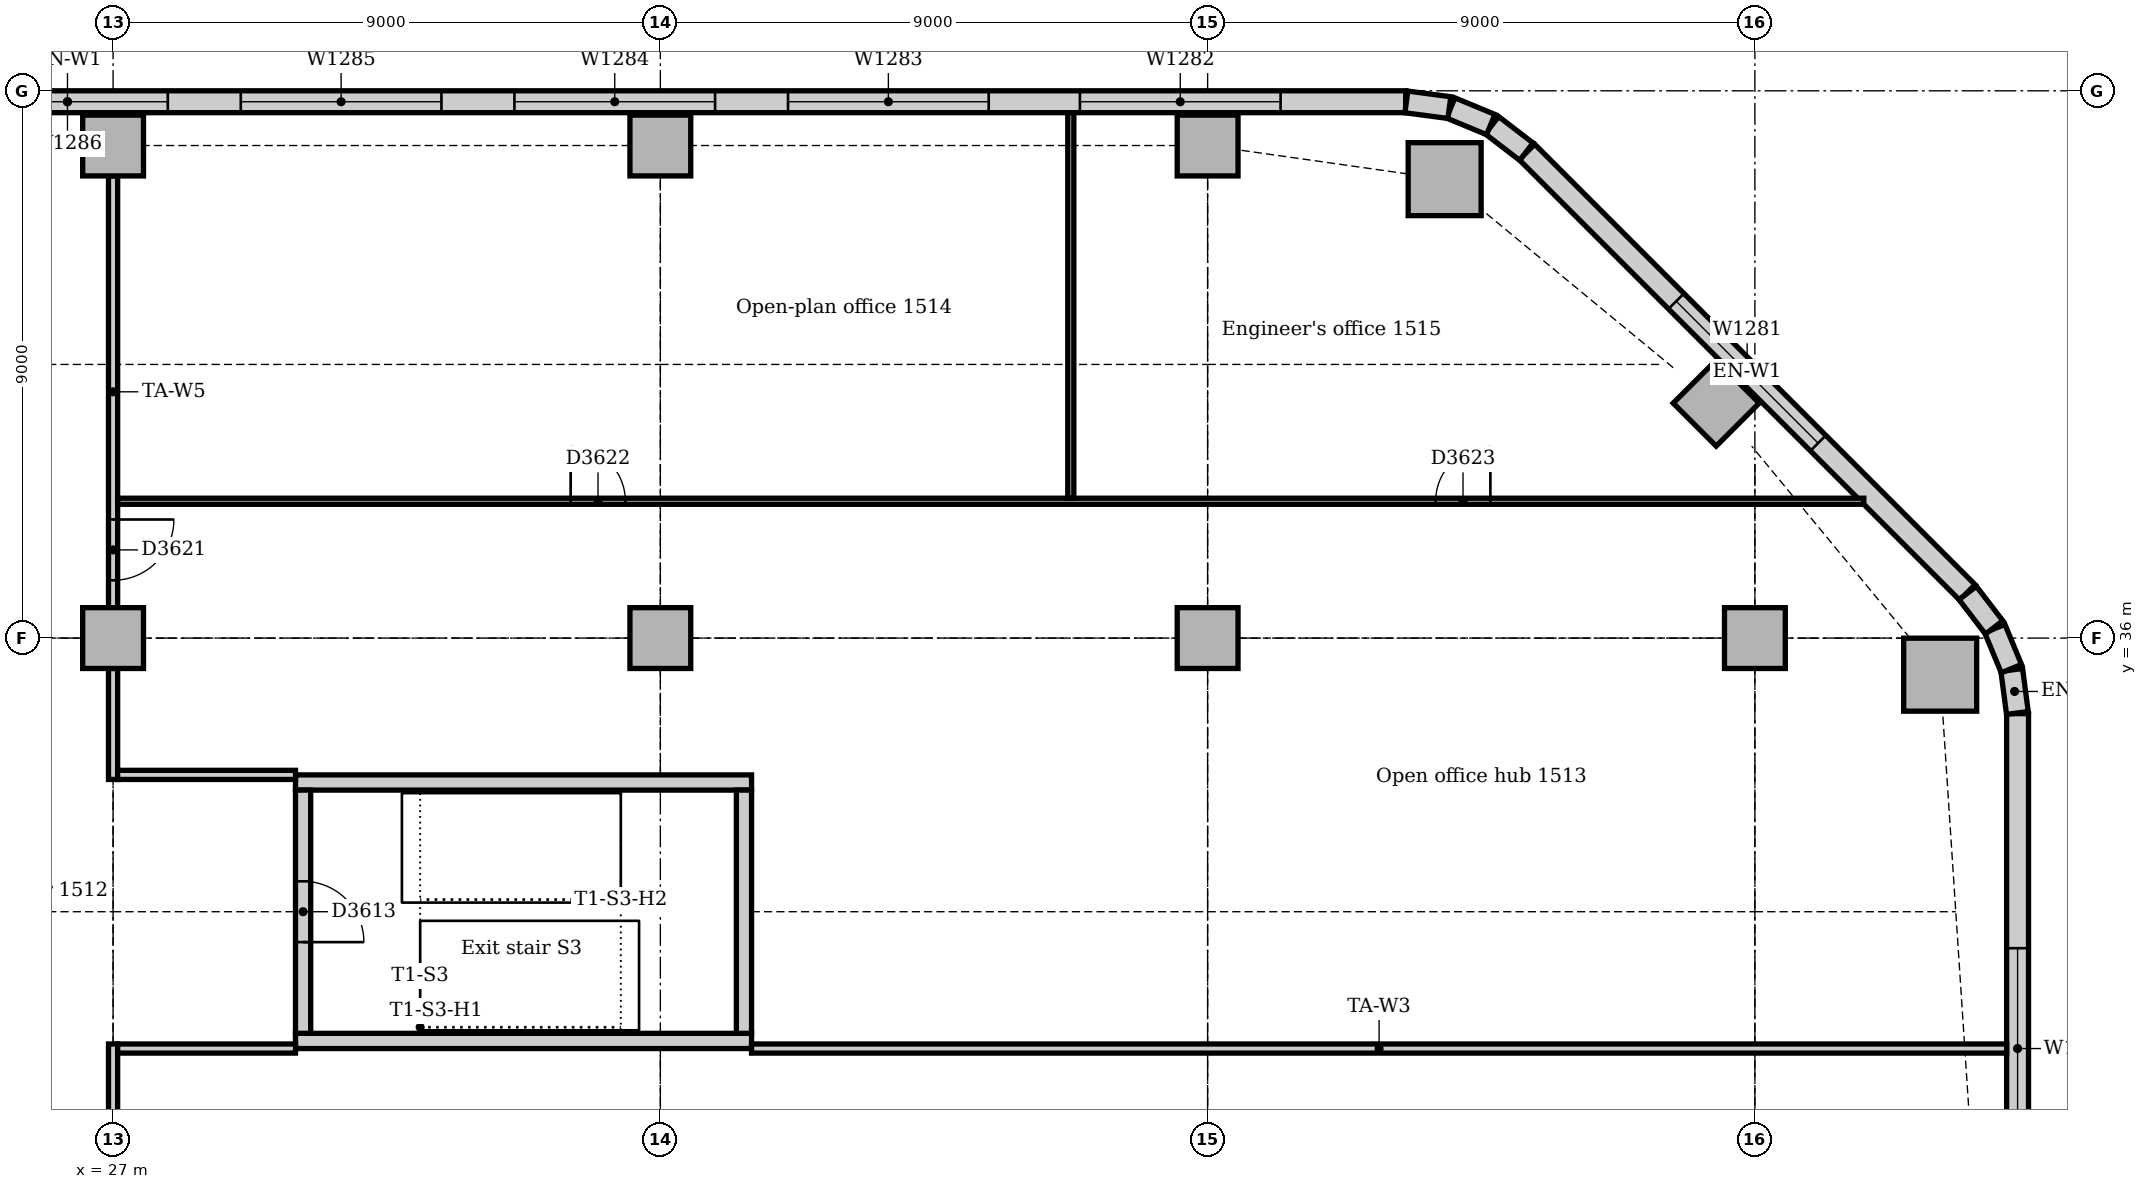
"""IFC4 building model, lengths in metres.
Left out: names, types, materials, properties, quantities, classifications, styles, units other than length and angle.
Written with IfcOpenShell. Run it as: python <this file> out.ifc"""

import sys

from ifc_helpers import new_model, si_unit, direction, frame, frame_2d, origin, origin_2d, place, context, subcontext, project, spatial, rectangle, extrude, element, fill, save


model = new_model("IFC4")
c1 = context("Model", 3, precision=1e-05, world=origin(), true_north=direction((0.0, 1.0)))
c2 = subcontext(c1, "Body", "Model", "MODEL_VIEW")
j1 = project(units=[si_unit("LENGTHUNIT", "METRE"), si_unit("PLANEANGLEUNIT", "RADIAN")], contexts=[c1])
p1 = place(None, origin())
s1 = spatial("IfcSite", under=j1, at=p1, CompositionType="ELEMENT")
p2 = place(p1, origin())
s2 = spatial("IfcBuilding", under=s1, at=p2, CompositionType="ELEMENT")
p3 = place(p2, frame((0.0, 0.0, 67.0)))
s3 = spatial("IfcBuildingStorey", under=s2, at=p3, CompositionType="ELEMENT", Elevation=67.0)
for number, where, z_axis, x_axis in (
    (1, (30.0, 29.375, 0.0), (0.0, 0.0, 1.0), (1.0, 0.0, 0.0)),
    (2, (37.5, 33.625, 0.0), (0.0, 0.0, 1.0), (-1.0, 0.0, 0.0)),
):
    element("IfcWall", number, at=place(p3, frame(where, z_axis=z_axis, x_axis=x_axis)), inside=s3, PredefinedType="SOLIDWALL", context=c2, shape_type="SweptSolid", body=[
        extrude(rectangle(XDim=7.5, YDim=0.25, at=frame_2d((3.75, 0.0))), origin(), (0.0, 0.0, 1.0), 4.0),
    ])
p4 = place(p3, frame((37.375, 29.5, 0.0), z_axis=(0.0, 0.0, 1.0), x_axis=(0.0, 1.0, 0.0)))
e3 = element("IfcWall", 3, at=p4, inside=s3, PredefinedType="SOLIDWALL", context=c2, shape_type="SweptSolid", body=[
    extrude(rectangle(XDim=4.0, YDim=0.25, at=frame_2d((2.0, 0.0))), origin(), (0.0, 0.0, 1.0), 4.0),
])
p5 = place(p3, frame((30.125, 33.5, 0.0), z_axis=(0.0, 0.0, 1.0), x_axis=(0.0, -1.0, 0.0)))
e4 = element("IfcWall", 4, at=p5, inside=s3, PredefinedType="SOLIDWALL", context=c2, shape_type="SweptSolid", body=[
    extrude(rectangle(XDim=4.0, YDim=0.25, at=frame_2d((2.0, 0.0))), origin(), (0.0, 0.0, 1.0), 4.0),
])
p6 = place(p5, frame((1.5, 0.0, 0.0)))
e5 = element("IfcOpeningElement", 5, at=p6, cuts=e4, PredefinedType="OPENING", context=c2, shape_type="SweptSolid", body=[
    extrude(rectangle(XDim=1.0, YDim=2.1, at=frame_2d((0.5, 1.05))), frame((0.0, 0.135, 0.0), z_axis=(0.0, -1.0, 0.0), x_axis=(1.0, 0.0, 0.0)), (0.0, 0.0, 1.0), 0.27),
])
for number, where, z_axis, x_axis in (
    (6, (57.047, 35.398, 0.0), (0.0, 0.0, 1.0), (1.0, 0.0, 0.0)),
    (7, (48.898, 43.547, 0.0), (0.0, 0.0, 1.0), (1.0, 0.0, 0.0)),
):
    element("IfcColumn", number, at=place(p3, frame(where, z_axis=z_axis, x_axis=x_axis)), inside=s3, PredefinedType="COLUMN", context=c2, shape_type="SweptSolid", body=[
        extrude(rectangle(XDim=1.2, YDim=1.2, at=origin_2d()), origin(), (0.0, 0.0, 1.0), 3.85),
    ])
for number, where, z_axis, x_axis in (
    (8, (53.364, 39.864, 0.0), (0.0, 0.0, 1.0), (0.707, 0.707, 0.0)),
    (9, (27.0, 44.1, 0.0), (0.0, 0.0, 1.0), (1.0, 0.0, 0.0)),
    (10, (36.0, 44.1, 0.0), (0.0, 0.0, 1.0), (1.0, 0.0, 0.0)),
    (11, (45.0, 44.1, 0.0), (0.0, 0.0, 1.0), (1.0, 0.0, 0.0)),
    (12, (27.0, 36.0, 0.0), (0.0, 0.0, 1.0), (1.0, 0.0, 0.0)),
    (13, (36.0, 36.0, 0.0), (0.0, 0.0, 1.0), (1.0, 0.0, 0.0)),
    (14, (45.0, 36.0, 0.0), (0.0, 0.0, 1.0), (1.0, 0.0, 0.0)),
    (15, (54.0, 36.0, 0.0), (0.0, 0.0, 1.0), (1.0, 0.0, 0.0)),
):
    element("IfcColumn", number, at=place(p3, frame(where, z_axis=z_axis, x_axis=x_axis)), inside=s3, PredefinedType="COLUMN", context=c2, shape_type="SweptSolid", body=[
        extrude(rectangle(XDim=1.0, YDim=1.0, at=origin_2d()), origin(), (0.0, 0.0, 1.0), 3.85),
    ])
p7 = place(p3, frame((58.32, 10.243, 0.0), z_axis=(0.0, 0.0, 1.0), x_axis=(0.0, 1.0, 0.0)))
e16 = element("IfcWall", 16, at=p7, inside=s3, PredefinedType="STANDARD", context=c2, shape_type="SweptSolid", body=[
    extrude(rectangle(XDim=24.515, YDim=0.36, at=frame_2d((12.257, 0.0))), origin(), (0.0, 0.0, 1.0), 3.85),
])
p8 = place(p7, frame((3.857, 0.0, 0.9)))
e17 = element("IfcOpeningElement", 17, at=p8, cuts=e16, PredefinedType="OPENING", context=c2, shape_type="SweptSolid", body=[
    extrude(rectangle(XDim=3.3, YDim=1.6, at=frame_2d((1.65, 0.8))), frame((0.0, 0.19, 0.0), z_axis=(0.0, -1.0, 0.0), x_axis=(1.0, 0.0, 0.0)), (0.0, 0.0, 1.0), 0.38),
])
p9 = place(p7, frame((8.757, 0.0, 0.9)))
e18 = element("IfcOpeningElement", 18, at=p9, cuts=e16, PredefinedType="OPENING", context=c2, shape_type="SweptSolid", body=[
    extrude(rectangle(XDim=1.8, YDim=1.6, at=frame_2d((0.9, 0.8))), frame((0.0, 0.19, 0.0), z_axis=(0.0, -1.0, 0.0), x_axis=(1.0, 0.0, 0.0)), (0.0, 0.0, 1.0), 0.38),
])
p10 = place(p7, frame((12.857, 0.0, 0.9)))
e19 = element("IfcOpeningElement", 19, at=p10, cuts=e16, PredefinedType="OPENING", context=c2, shape_type="SweptSolid", body=[
    extrude(rectangle(XDim=3.3, YDim=1.6, at=frame_2d((1.65, 0.8))), frame((0.0, 0.19, 0.0), z_axis=(0.0, -1.0, 0.0), x_axis=(1.0, 0.0, 0.0)), (0.0, 0.0, 1.0), 0.38),
])
p11 = place(p7, frame((17.357, 0.0, 0.9)))
e20 = element("IfcOpeningElement", 20, at=p11, cuts=e16, PredefinedType="OPENING", context=c2, shape_type="SweptSolid", body=[
    extrude(rectangle(XDim=3.3, YDim=1.6, at=frame_2d((1.65, 0.8))), frame((0.0, 0.19, 0.0), z_axis=(0.0, -1.0, 0.0), x_axis=(1.0, 0.0, 0.0)), (0.0, 0.0, 1.0), 0.38),
])
p12 = place(p3, frame((57.494, 36.751, 0.0), z_axis=(0.0, 0.0, 1.0), x_axis=(-0.707106781187, 0.707106781187, 0.0)))
e21 = element("IfcWall", 21, at=p12, inside=s3, PredefinedType="STANDARD", context=c2, shape_type="SweptSolid", body=[
    extrude(rectangle(XDim=10.243, YDim=0.36, at=frame_2d((5.121, 0.0))), origin(), (0.0, 0.0, 1.0), 3.85),
])
p13 = place(p12, frame((3.471, 0.0, 0.9)))
e22 = element("IfcOpeningElement", 22, at=p13, cuts=e21, PredefinedType="OPENING", context=c2, shape_type="SweptSolid", body=[
    extrude(rectangle(XDim=3.3, YDim=1.6, at=frame_2d((1.65, 0.8))), frame((0.0, 0.19, 0.0), z_axis=(0.0, -1.0, 0.0), x_axis=(1.0, 0.0, 0.0)), (0.0, 0.0, 1.0), 0.38),
])
p14 = place(p3, frame((48.257, 44.82, 0.0), z_axis=(0.0, 0.0, 1.0), x_axis=(-1.0, 0.0, 0.0)))
e23 = element("IfcWall", 23, at=p14, inside=s3, PredefinedType="STANDARD", context=c2, shape_type="SweptSolid", body=[
    extrude(rectangle(XDim=44.015, YDim=0.36, at=frame_2d((22.007, 0.0))), origin(), (0.0, 0.0, 1.0), 3.85),
])
p15 = place(p14, frame((2.057, 0.0, 0.9)))
e24 = element("IfcOpeningElement", 24, at=p15, cuts=e23, PredefinedType="OPENING", context=c2, shape_type="SweptSolid", body=[
    extrude(rectangle(XDim=3.3, YDim=1.6, at=frame_2d((1.65, 0.8))), frame((0.0, 0.19, 0.0), z_axis=(0.0, -1.0, 0.0), x_axis=(1.0, 0.0, 0.0)), (0.0, 0.0, 1.0), 0.38),
])
p16 = place(p14, frame((6.857, 0.0, 0.9)))
e25 = element("IfcOpeningElement", 25, at=p16, cuts=e23, PredefinedType="OPENING", context=c2, shape_type="SweptSolid", body=[
    extrude(rectangle(XDim=3.3, YDim=1.6, at=frame_2d((1.65, 0.8))), frame((0.0, 0.19, 0.0), z_axis=(0.0, -1.0, 0.0), x_axis=(1.0, 0.0, 0.0)), (0.0, 0.0, 1.0), 0.38),
])
p17 = place(p14, frame((11.357, 0.0, 0.9)))
e26 = element("IfcOpeningElement", 26, at=p17, cuts=e23, PredefinedType="OPENING", context=c2, shape_type="SweptSolid", body=[
    extrude(rectangle(XDim=3.3, YDim=1.6, at=frame_2d((1.65, 0.8))), frame((0.0, 0.19, 0.0), z_axis=(0.0, -1.0, 0.0), x_axis=(1.0, 0.0, 0.0)), (0.0, 0.0, 1.0), 0.38),
])
p18 = place(p14, frame((15.857, 0.0, 0.9)))
e27 = element("IfcOpeningElement", 27, at=p18, cuts=e23, PredefinedType="OPENING", context=c2, shape_type="SweptSolid", body=[
    extrude(rectangle(XDim=3.3, YDim=1.6, at=frame_2d((1.65, 0.8))), frame((0.0, 0.19, 0.0), z_axis=(0.0, -1.0, 0.0), x_axis=(1.0, 0.0, 0.0)), (0.0, 0.0, 1.0), 0.38),
])
p19 = place(p14, frame((20.357, 0.0, 0.9)))
e28 = element("IfcOpeningElement", 28, at=p19, cuts=e23, PredefinedType="OPENING", context=c2, shape_type="SweptSolid", body=[
    extrude(rectangle(XDim=3.3, YDim=1.6, at=frame_2d((1.65, 0.8))), frame((0.0, 0.19, 0.0), z_axis=(0.0, -1.0, 0.0), x_axis=(1.0, 0.0, 0.0)), (0.0, 0.0, 1.0), 0.38),
])
p20 = place(p14, frame((25.957, 0.0, 0.9)))
e29 = element("IfcOpeningElement", 29, at=p20, cuts=e23, PredefinedType="OPENING", context=c2, shape_type="SweptSolid", body=[
    extrude(rectangle(XDim=1.8, YDim=1.6, at=frame_2d((0.9, 0.8))), frame((0.0, 0.19, 0.0), z_axis=(0.0, -1.0, 0.0), x_axis=(1.0, 0.0, 0.0)), (0.0, 0.0, 1.0), 0.38),
])
p21 = place(p14, frame((29.357, 0.0, 0.9)))
e30 = element("IfcOpeningElement", 30, at=p21, cuts=e23, PredefinedType="OPENING", context=c2, shape_type="SweptSolid", body=[
    extrude(rectangle(XDim=3.3, YDim=1.6, at=frame_2d((1.65, 0.8))), frame((0.0, 0.19, 0.0), z_axis=(0.0, -1.0, 0.0), x_axis=(1.0, 0.0, 0.0)), (0.0, 0.0, 1.0), 0.38),
])
p22 = place(p14, frame((33.857, 0.0, 0.9)))
e31 = element("IfcOpeningElement", 31, at=p22, cuts=e23, PredefinedType="OPENING", context=c2, shape_type="SweptSolid", body=[
    extrude(rectangle(XDim=3.3, YDim=1.6, at=frame_2d((1.65, 0.8))), frame((0.0, 0.19, 0.0), z_axis=(0.0, -1.0, 0.0), x_axis=(1.0, 0.0, 0.0)), (0.0, 0.0, 1.0), 0.38),
])
p23 = place(p14, frame((38.357, 0.0, 0.9)))
e32 = element("IfcOpeningElement", 32, at=p23, cuts=e23, PredefinedType="OPENING", context=c2, shape_type="SweptSolid", body=[
    extrude(rectangle(XDim=3.3, YDim=1.6, at=frame_2d((1.65, 0.8))), frame((0.0, 0.19, 0.0), z_axis=(0.0, -1.0, 0.0), x_axis=(1.0, 0.0, 0.0)), (0.0, 0.0, 1.0), 0.38),
])
for number, where, z_axis, x_axis in (
    (33, (58.317, 34.769, 0.0), (0.0, 0.0, 1.0), (-0.131, 0.991, 0.0)),
    (34, (58.218, 35.497, 0.0), (0.0, 0.0, 1.0), (-0.383, 0.924, 0.0)),
):
    element("IfcWall", number, at=place(p3, frame(where, z_axis=z_axis, x_axis=x_axis)), inside=s3, PredefinedType="STANDARD", context=c2, shape_type="SweptSolid", body=[
        extrude(rectangle(XDim=0.713, YDim=0.36, at=frame_2d((0.356, 0.0))), origin(), (0.0, 0.0, 1.0), 3.85),
    ])
for number, where, z_axis, x_axis in (
    (35, (57.934, 36.175, 0.0), (0.0, 0.0, 1.0), (-0.609, 0.793, 0.0)),
    (36, (50.241, 44.0, 0.0), (0.0, 0.0, 1.0), (-0.793, 0.609, 0.0)),
):
    element("IfcWall", number, at=place(p3, frame(where, z_axis=z_axis, x_axis=x_axis)), inside=s3, PredefinedType="STANDARD", context=c2, shape_type="SweptSolid", body=[
        extrude(rectangle(XDim=0.713, YDim=0.36, at=frame_2d((0.357, 0.0))), origin(), (0.0, 0.0, 1.0), 3.85),
    ])
for number, where, z_axis, x_axis in (
    (37, (49.656, 44.445, 0.0), (0.0, 0.0, 1.0), (-0.924, 0.383, 0.0)),
    (38, (48.976, 44.724, 0.0), (0.0, 0.0, 1.0), (-0.991, 0.131, 0.0)),
):
    element("IfcWall", number, at=place(p3, frame(where, z_axis=z_axis, x_axis=x_axis)), inside=s3, PredefinedType="STANDARD", context=c2, shape_type="SweptSolid", body=[
        extrude(rectangle(XDim=0.713, YDim=0.36, at=frame_2d((0.356, 0.0))), origin(), (0.0, 0.0, 1.0), 3.85),
    ])
p24 = place(p3, frame((27.0, 33.675, 0.0), z_axis=(0.0, 0.0, 1.0), x_axis=(0.0, 1.0, 0.0)))
e39 = element("IfcWall", 39, at=p24, inside=s3, PredefinedType="PARTITIONING", context=c2, shape_type="SweptSolid", body=[
    extrude(rectangle(XDim=1.825, YDim=0.15, at=frame_2d((0.912, 0.0))), origin(), (0.0, 0.0, 1.0), 3.158),
])
p25 = place(p3, frame((27.0, 36.5, 0.0), z_axis=(0.0, 0.0, 1.0), x_axis=(0.0, 1.0, 0.0)))
e40 = element("IfcWall", 40, at=p25, inside=s3, PredefinedType="PARTITIONING", context=c2, shape_type="SweptSolid", body=[
    extrude(rectangle(XDim=7.1, YDim=0.15, at=frame_2d((3.55, 0.0))), origin(), (0.0, 0.0, 1.0), 3.158),
])
p26 = place(p25, frame((0.45, 0.0, 0.0)))
e41 = element("IfcOpeningElement", 41, at=p26, cuts=e40, PredefinedType="OPENING", context=c2, shape_type="SweptSolid", body=[
    extrude(rectangle(XDim=1.0, YDim=2.1, at=frame_2d((0.5, 1.05))), frame((0.0, 0.085, 0.0), z_axis=(0.0, -1.0, 0.0), x_axis=(1.0, 0.0, 0.0)), (0.0, 0.0, 1.0), 0.17),
])
p27 = place(p3, frame((27.0, 27.5, 0.0), z_axis=(0.0, 0.0, 1.0), x_axis=(0.0, 1.0, 0.0)))
e42 = element("IfcWall", 42, at=p27, inside=s3, PredefinedType="PARTITIONING", context=c2, shape_type="SweptSolid", body=[
    extrude(rectangle(XDim=1.825, YDim=0.15, at=frame_2d((0.912, 0.0))), origin(), (0.0, 0.0, 1.0), 3.158),
])
for number, where, z_axis, x_axis in (
    (43, (27.075, 29.25, 0.0), (0.0, 0.0, 1.0), (1.0, 0.0, 0.0)),
    (44, (27.075, 33.75, 0.0), (0.0, 0.0, 1.0), (1.0, 0.0, 0.0)),
):
    element("IfcWall", number, at=place(p3, frame(where, z_axis=z_axis, x_axis=x_axis)), inside=s3, PredefinedType="PARTITIONING", context=c2, shape_type="SweptSolid", body=[
        extrude(rectangle(XDim=2.925, YDim=0.15, at=frame_2d((1.462, 0.0))), origin(), (0.0, 0.0, 1.0), 3.85),
    ])
p28 = place(p3, frame((37.5, 29.25, 0.0), z_axis=(0.0, 0.0, 1.0), x_axis=(1.0, 0.0, 0.0)))
e45 = element("IfcWall", 45, at=p28, inside=s3, PredefinedType="PARTITIONING", context=c2, shape_type="SweptSolid", body=[
    extrude(rectangle(XDim=20.64, YDim=0.15, at=frame_2d((10.32, 0.0))), origin(), (0.0, 0.0, 1.0), 3.85),
])
p29 = place(p3, frame((27.075, 38.25, 0.0), z_axis=(0.0, 0.0, 1.0), x_axis=(1.0, 0.0, 0.0)))
e46 = element("IfcWall", 46, at=p29, inside=s3, PredefinedType="PARTITIONING", context=c2, shape_type="SweptSolid", body=[
    extrude(rectangle(XDim=28.716, YDim=0.1, at=frame_2d((14.358, 0.0))), origin(), (0.0, 0.0, 1.0), 3.85),
])
p30 = place(p29, frame((7.45, 0.0, 0.0)))
e47 = element("IfcOpeningElement", 47, at=p30, cuts=e46, PredefinedType="OPENING", context=c2, shape_type="SweptSolid", body=[
    extrude(rectangle(XDim=0.9, YDim=2.1, at=frame_2d((0.45, 1.05))), frame((0.0, 0.06, 0.0), z_axis=(0.0, -1.0, 0.0), x_axis=(1.0, 0.0, 0.0)), (0.0, 0.0, 1.0), 0.12),
])
p31 = place(p29, frame((21.675, 0.0, 0.0)))
e48 = element("IfcOpeningElement", 48, at=p31, cuts=e46, PredefinedType="OPENING", context=c2, shape_type="SweptSolid", body=[
    extrude(rectangle(XDim=0.9, YDim=2.1, at=frame_2d((0.45, 1.05))), frame((0.0, 0.06, 0.0), z_axis=(0.0, -1.0, 0.0), x_axis=(1.0, 0.0, 0.0)), (0.0, 0.0, 1.0), 0.12),
])
p32 = place(p3, frame((42.75, 38.3, 0.0), z_axis=(0.0, 0.0, 1.0), x_axis=(0.0, 1.0, 0.0)))
e49 = element("IfcWall", 49, at=p32, inside=s3, PredefinedType="PARTITIONING", context=c2, shape_type="SweptSolid", body=[
    extrude(rectangle(XDim=6.34, YDim=0.1, at=frame_2d((3.17, 0.0))), origin(), (0.0, 0.0, 1.0), 3.85),
])
p33 = place(p11, origin())
e50 = element("IfcWindow", 50, at=p33, inside=s3, PartitioningType="SINGLE_PANEL", PredefinedType="WINDOW", context=c2, shape_type="SweptSolid", body=[
    extrude(rectangle(XDim=3.3, YDim=1.6, at=frame_2d((1.65, 0.8))), frame((0.0, 0.13, 0.0), z_axis=(0.0, -1.0, 0.0), x_axis=(1.0, 0.0, 0.0)), (0.0, 0.0, 1.0), 0.06),
])
fill(e20, e50)
p34 = place(p13, origin())
e51 = element("IfcWindow", 51, at=p34, inside=s3, PartitioningType="SINGLE_PANEL", PredefinedType="WINDOW", context=c2, shape_type="SweptSolid", body=[
    extrude(rectangle(XDim=3.3, YDim=1.6, at=frame_2d((1.65, 0.8))), frame((0.0, 0.13, 0.0), z_axis=(0.0, -1.0, 0.0), x_axis=(1.0, 0.0, 0.0)), (0.0, 0.0, 1.0), 0.06),
])
fill(e22, e51)
p35 = place(p15, origin())
e52 = element("IfcWindow", 52, at=p35, inside=s3, PartitioningType="SINGLE_PANEL", PredefinedType="WINDOW", context=c2, shape_type="SweptSolid", body=[
    extrude(rectangle(XDim=3.3, YDim=1.6, at=frame_2d((1.65, 0.8))), frame((0.0, 0.13, 0.0), z_axis=(0.0, -1.0, 0.0), x_axis=(1.0, 0.0, 0.0)), (0.0, 0.0, 1.0), 0.06),
])
fill(e24, e52)
p36 = place(p16, origin())
e53 = element("IfcWindow", 53, at=p36, inside=s3, PartitioningType="SINGLE_PANEL", PredefinedType="WINDOW", context=c2, shape_type="SweptSolid", body=[
    extrude(rectangle(XDim=3.3, YDim=1.6, at=frame_2d((1.65, 0.8))), frame((0.0, 0.13, 0.0), z_axis=(0.0, -1.0, 0.0), x_axis=(1.0, 0.0, 0.0)), (0.0, 0.0, 1.0), 0.06),
])
fill(e25, e53)
p37 = place(p17, origin())
e54 = element("IfcWindow", 54, at=p37, inside=s3, PartitioningType="SINGLE_PANEL", PredefinedType="WINDOW", context=c2, shape_type="SweptSolid", body=[
    extrude(rectangle(XDim=3.3, YDim=1.6, at=frame_2d((1.65, 0.8))), frame((0.0, 0.13, 0.0), z_axis=(0.0, -1.0, 0.0), x_axis=(1.0, 0.0, 0.0)), (0.0, 0.0, 1.0), 0.06),
])
fill(e26, e54)
p38 = place(p18, origin())
e55 = element("IfcWindow", 55, at=p38, inside=s3, PartitioningType="SINGLE_PANEL", PredefinedType="WINDOW", context=c2, shape_type="SweptSolid", body=[
    extrude(rectangle(XDim=3.3, YDim=1.6, at=frame_2d((1.65, 0.8))), frame((0.0, 0.13, 0.0), z_axis=(0.0, -1.0, 0.0), x_axis=(1.0, 0.0, 0.0)), (0.0, 0.0, 1.0), 0.06),
])
fill(e27, e55)
p39 = place(p19, origin())
e56 = element("IfcWindow", 56, at=p39, inside=s3, PartitioningType="SINGLE_PANEL", PredefinedType="WINDOW", context=c2, shape_type="SweptSolid", body=[
    extrude(rectangle(XDim=3.3, YDim=1.6, at=frame_2d((1.65, 0.8))), frame((0.0, 0.13, 0.0), z_axis=(0.0, -1.0, 0.0), x_axis=(1.0, 0.0, 0.0)), (0.0, 0.0, 1.0), 0.06),
])
fill(e28, e56)
p40 = place(p6, origin())
e57 = element("IfcDoor", 57, at=p40, inside=s3, OperationType="SINGLE_SWING_RIGHT", PredefinedType="DOOR", context=c2, shape_type="SweptSolid", body=[
    extrude(rectangle(XDim=1.0, YDim=2.1, at=frame_2d((0.5, 1.05))), frame((0.0, 0.025, 0.0), z_axis=(0.0, -1.0, 0.0), x_axis=(1.0, 0.0, 0.0)), (0.0, 0.0, 1.0), 0.05),
])
fill(e5, e57)
p41 = place(p26, frame((1.0, 0.0, 0.0), z_axis=(0.0, 0.0, 1.0), x_axis=(-1.0, 0.0, 0.0)))
e58 = element("IfcDoor", 58, at=p41, inside=s3, OperationType="SINGLE_SWING_LEFT", PredefinedType="DOOR", context=c2, shape_type="SweptSolid", body=[
    extrude(rectangle(XDim=1.0, YDim=2.1, at=frame_2d((0.5, 1.05))), frame((0.0, 0.025, 0.0), z_axis=(0.0, -1.0, 0.0), x_axis=(1.0, 0.0, 0.0)), (0.0, 0.0, 1.0), 0.05),
])
fill(e41, e58)
p42 = place(p30, origin())
e59 = element("IfcDoor", 59, at=p42, inside=s3, OperationType="SINGLE_SWING_LEFT", PredefinedType="DOOR", context=c2, shape_type="SweptSolid", body=[
    extrude(rectangle(XDim=0.9, YDim=2.1, at=frame_2d((0.45, 1.05))), frame((0.0, 0.025, 0.0), z_axis=(0.0, -1.0, 0.0), x_axis=(1.0, 0.0, 0.0)), (0.0, 0.0, 1.0), 0.05),
])
fill(e47, e59)
p43 = place(p31, origin())
e60 = element("IfcDoor", 60, at=p43, inside=s3, OperationType="SINGLE_SWING_RIGHT", PredefinedType="DOOR", context=c2, shape_type="SweptSolid", body=[
    extrude(rectangle(XDim=0.9, YDim=2.1, at=frame_2d((0.45, 1.05))), frame((0.0, 0.025, 0.0), z_axis=(0.0, -1.0, 0.0), x_axis=(1.0, 0.0, 0.0)), (0.0, 0.0, 1.0), 0.05),
])
fill(e48, e60)
save(model, sys.argv[1])
